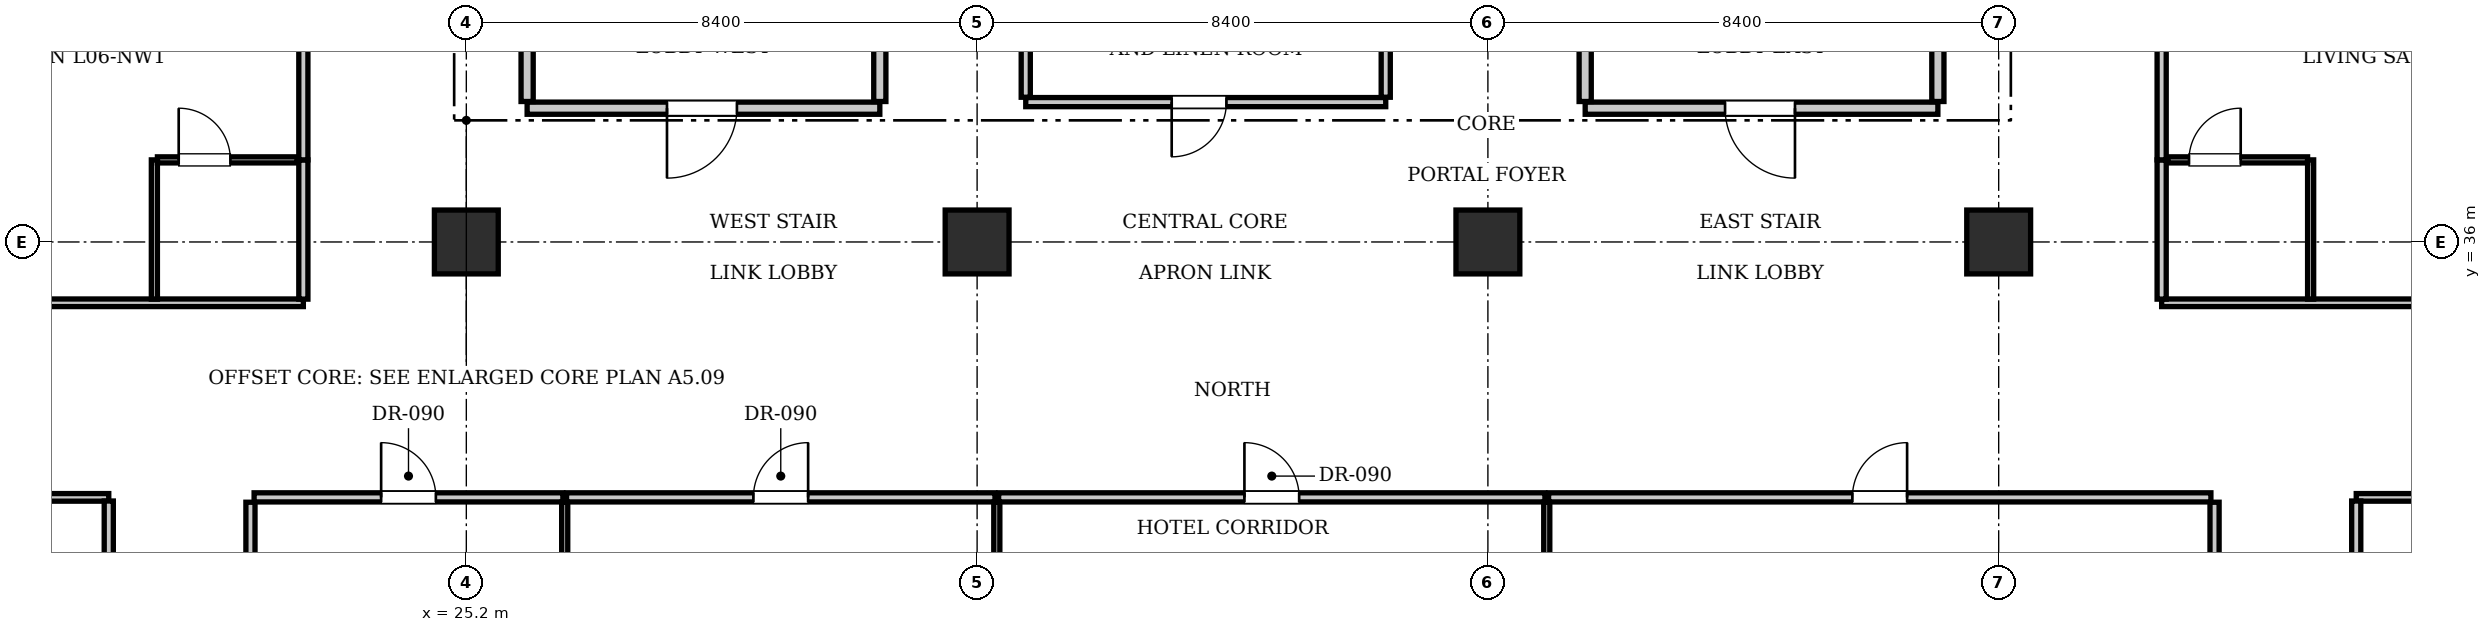
"""IFC4 building model, lengths in metres.
Left out: names, types, materials, properties, quantities, classifications, styles, units other than length and angle.
Written with IfcOpenShell. Run it as: python <this file> out.ifc"""

import sys

from ifc_helpers import new_model, si_unit, direction, frame, frame_2d, origin, origin_2d, place, context, subcontext, project, spatial, rectangle, extrude, element, fill, save


model = new_model("IFC4")
c1 = context("Model", 3, precision=1e-05, world=origin(), true_north=direction((0.0, 1.0)))
c2 = subcontext(c1, "Body", "Model", "MODEL_VIEW")
j1 = project(units=[si_unit("LENGTHUNIT", "METRE"), si_unit("PLANEANGLEUNIT", "RADIAN")], contexts=[c1])
p1 = place(None, origin())
s1 = spatial("IfcSite", under=j1, at=p1, CompositionType="ELEMENT")
p2 = place(p1, origin())
s2 = spatial("IfcBuilding", under=s1, at=p2, CompositionType="ELEMENT")
p3 = place(p2, frame((0.0, 0.0, 30.8)))
s3 = spatial("IfcBuildingStorey", under=s2, at=p3, CompositionType="ELEMENT", Elevation=30.8)
for number, where, z_axis, x_axis in (
    (1, (25.2, 36.0, 0.0), (0.0, 0.0, 1.0), (1.0, 0.0, 0.0)),
    (2, (33.6, 36.0, 0.0), (0.0, 0.0, 1.0), (1.0, 0.0, 0.0)),
    (3, (42.0, 36.0, 0.0), (0.0, 0.0, 1.0), (1.0, 0.0, 0.0)),
    (4, (50.4, 36.0, 0.0), (0.0, 0.0, 1.0), (1.0, 0.0, 0.0)),
):
    element("IfcColumn", number, at=place(p3, frame(where, z_axis=z_axis, x_axis=x_axis)), inside=s3, PredefinedType="COLUMN", context=c2, shape_type="SweptSolid", body=[
        extrude(rectangle(XDim=1.05, YDim=1.05, at=origin_2d()), origin(), (0.0, 0.0, 1.0), 3.85),
    ])
p4 = place(p3, frame((26.2, 38.2, 0.0), z_axis=(0.0, 0.0, 1.0), x_axis=(1.0, 0.0, 0.0)))
e5 = element("IfcWall", 5, at=p4, inside=s3, PredefinedType="PARTITIONING", context=c2, shape_type="SweptSolid", body=[
    extrude(rectangle(XDim=5.8, YDim=0.2, at=frame_2d((2.9, 0.0))), origin(), (0.0, 0.0, 1.0), 3.61),
])
p5 = place(p4, frame((2.3, 0.0, 0.0)))
e6 = element("IfcOpeningElement", 6, at=p5, cuts=e5, PredefinedType="OPENING", context=c2, shape_type="SweptSolid", body=[
    extrude(rectangle(XDim=1.15, YDim=2.15, at=frame_2d((0.575, 1.075))), frame((0.0, 0.11, 0.0), z_axis=(0.0, -1.0, 0.0), x_axis=(1.0, 0.0, 0.0)), (0.0, 0.0, 1.0), 0.22),
])
for number, where, z_axis, x_axis in (
    (7, (26.2, 38.31, 0.0), (0.0, 0.0, 1.0), (0.0, 1.0, 0.0)),
    (8, (32.0, 38.31, 0.0), (0.0, 0.0, 1.0), (0.0, 1.0, 0.0)),
):
    element("IfcWall", number, at=place(p3, frame(where, z_axis=z_axis, x_axis=x_axis)), inside=s3, PredefinedType="PARTITIONING", context=c2, shape_type="SweptSolid", body=[
        extrude(rectangle(XDim=3.07, YDim=0.2, at=frame_2d((1.535, 0.0))), origin(), (0.0, 0.0, 1.0), 3.61),
    ])
p6 = place(p3, frame((43.6, 38.2, 0.0), z_axis=(0.0, 0.0, 1.0), x_axis=(1.0, 0.0, 0.0)))
e9 = element("IfcWall", 9, at=p6, inside=s3, PredefinedType="PARTITIONING", context=c2, shape_type="SweptSolid", body=[
    extrude(rectangle(XDim=5.8, YDim=0.2, at=frame_2d((2.9, 0.0))), origin(), (0.0, 0.0, 1.0), 3.61),
])
p7 = place(p6, frame((2.3, 0.0, 0.0)))
e10 = element("IfcOpeningElement", 10, at=p7, cuts=e9, PredefinedType="OPENING", context=c2, shape_type="SweptSolid", body=[
    extrude(rectangle(XDim=1.15, YDim=2.15, at=frame_2d((0.575, 1.075))), frame((0.0, 0.11, 0.0), z_axis=(0.0, -1.0, 0.0), x_axis=(1.0, 0.0, 0.0)), (0.0, 0.0, 1.0), 0.22),
])
for number, where, z_axis, x_axis in (
    (11, (43.6, 38.31, 0.0), (0.0, 0.0, 1.0), (0.0, 1.0, 0.0)),
    (12, (49.4, 38.31, 0.0), (0.0, 0.0, 1.0), (0.0, 1.0, 0.0)),
):
    element("IfcWall", number, at=place(p3, frame(where, z_axis=z_axis, x_axis=x_axis)), inside=s3, PredefinedType="PARTITIONING", context=c2, shape_type="SweptSolid", body=[
        extrude(rectangle(XDim=3.07, YDim=0.2, at=frame_2d((1.535, 0.0))), origin(), (0.0, 0.0, 1.0), 3.61),
    ])
p8 = place(p3, frame((34.4, 38.3, 0.0), z_axis=(0.0, 0.0, 1.0), x_axis=(1.0, 0.0, 0.0)))
e13 = element("IfcWall", 13, at=p8, inside=s3, PredefinedType="PARTITIONING", context=c2, shape_type="SweptSolid", body=[
    extrude(rectangle(XDim=5.92, YDim=0.15, at=frame_2d((2.96, 0.0))), origin(), (0.0, 0.0, 1.0), 3.61),
])
p9 = place(p8, frame((2.4, 0.0, 0.0)))
e14 = element("IfcOpeningElement", 14, at=p9, cuts=e13, PredefinedType="OPENING", context=c2, shape_type="SweptSolid", body=[
    extrude(rectangle(XDim=0.9, YDim=2.1, at=frame_2d((0.45, 1.05))), frame((0.0, 0.085, 0.0), z_axis=(0.0, -1.0, 0.0), x_axis=(1.0, 0.0, 0.0)), (0.0, 0.0, 1.0), 0.17),
])
for number, where, z_axis, x_axis in (
    (15, (34.4, 38.38, 0.0), (0.0, 0.0, 1.0), (0.0, 1.0, 0.0)),
    (16, (40.32, 38.38, 0.0), (0.0, 0.0, 1.0), (0.0, 1.0, 0.0)),
):
    element("IfcWall", number, at=place(p3, frame(where, z_axis=z_axis, x_axis=x_axis)), inside=s3, PredefinedType="PARTITIONING", context=c2, shape_type="SweptSolid", body=[
        extrude(rectangle(XDim=2.84, YDim=0.15, at=frame_2d((1.42, 0.0))), origin(), (0.0, 0.0, 1.0), 3.61),
    ])
for number, where, z_axis, x_axis in (
    (17, (21.65, 23.48, 0.0), (0.0, 0.0, 1.0), (0.0, 1.0, 0.0)),
    (18, (53.95, 23.48, 0.0), (0.0, 0.0, 1.0), (0.0, 1.0, 0.0)),
):
    element("IfcWall", number, at=place(p3, frame(where, z_axis=z_axis, x_axis=x_axis)), inside=s3, PredefinedType="PARTITIONING", context=c2, shape_type="SweptSolid", body=[
        extrude(rectangle(XDim=8.24, YDim=0.15, at=frame_2d((4.12, 0.0))), origin(), (0.0, 0.0, 1.0), 3.61),
    ])
p10 = place(p3, frame((21.71, 31.8, 0.0), z_axis=(0.0, 0.0, 1.0), x_axis=(1.0, 0.0, 0.0)))
e19 = element("IfcWall", 19, at=p10, inside=s3, PredefinedType="PARTITIONING", context=c2, shape_type="SweptSolid", body=[
    extrude(rectangle(XDim=5.078, YDim=0.15, at=frame_2d((2.539, 0.0))), origin(), (0.0, 0.0, 1.0), 3.61),
])
p11 = place(p10, frame((2.089, 0.0, 0.0)))
e20 = element("IfcOpeningElement", 20, at=p11, cuts=e19, PredefinedType="OPENING", context=c2, shape_type="SweptSolid", body=[
    extrude(rectangle(XDim=0.9, YDim=2.1, at=frame_2d((0.45, 1.05))), frame((0.0, 0.085, 0.0), z_axis=(0.0, -1.0, 0.0), x_axis=(1.0, 0.0, 0.0)), (0.0, 0.0, 1.0), 0.17),
])
p12 = place(p3, frame((26.818, 23.48, 0.0), z_axis=(0.0, 0.0, 1.0), x_axis=(0.0, 1.0, 0.0)))
e21 = element("IfcWall", 21, at=p12, inside=s3, PredefinedType="PARTITIONING", context=c2, shape_type="SweptSolid", body=[
    extrude(rectangle(XDim=8.24, YDim=0.1, at=frame_2d((4.12, 0.0))), origin(), (0.0, 0.0, 1.0), 3.61),
])
p13 = place(p3, frame((26.848, 31.8, 0.0), z_axis=(0.0, 0.0, 1.0), x_axis=(1.0, 0.0, 0.0)))
e22 = element("IfcWall", 22, at=p13, inside=s3, PredefinedType="PARTITIONING", context=c2, shape_type="SweptSolid", body=[
    extrude(rectangle(XDim=7.046, YDim=0.15, at=frame_2d((3.523, 0.0))), origin(), (0.0, 0.0, 1.0), 3.61),
])
p14 = place(p13, frame((3.073, 0.0, 0.0)))
e23 = element("IfcOpeningElement", 23, at=p14, cuts=e22, PredefinedType="OPENING", context=c2, shape_type="SweptSolid", body=[
    extrude(rectangle(XDim=0.9, YDim=2.1, at=frame_2d((0.45, 1.05))), frame((0.0, 0.085, 0.0), z_axis=(0.0, -1.0, 0.0), x_axis=(1.0, 0.0, 0.0)), (0.0, 0.0, 1.0), 0.17),
])
p15 = place(p3, frame((33.924, 23.48, 0.0), z_axis=(0.0, 0.0, 1.0), x_axis=(0.0, 1.0, 0.0)))
e24 = element("IfcWall", 24, at=p15, inside=s3, PredefinedType="PARTITIONING", context=c2, shape_type="SweptSolid", body=[
    extrude(rectangle(XDim=8.24, YDim=0.1, at=frame_2d((4.12, 0.0))), origin(), (0.0, 0.0, 1.0), 3.61),
])
p16 = place(p3, frame((33.954, 31.8, 0.0), z_axis=(0.0, 0.0, 1.0), x_axis=(1.0, 0.0, 0.0)))
e25 = element("IfcWall", 25, at=p16, inside=s3, PredefinedType="PARTITIONING", context=c2, shape_type="SweptSolid", body=[
    extrude(rectangle(XDim=8.984, YDim=0.15, at=frame_2d((4.492, 0.0))), origin(), (0.0, 0.0, 1.0), 3.61),
])
p17 = place(p16, frame((4.042, 0.0, 0.0)))
e26 = element("IfcOpeningElement", 26, at=p17, cuts=e25, PredefinedType="OPENING", context=c2, shape_type="SweptSolid", body=[
    extrude(rectangle(XDim=0.9, YDim=2.1, at=frame_2d((0.45, 1.05))), frame((0.0, 0.085, 0.0), z_axis=(0.0, -1.0, 0.0), x_axis=(1.0, 0.0, 0.0)), (0.0, 0.0, 1.0), 0.17),
])
p18 = place(p3, frame((42.968, 23.48, 0.0), z_axis=(0.0, 0.0, 1.0), x_axis=(0.0, 1.0, 0.0)))
e27 = element("IfcWall", 27, at=p18, inside=s3, PredefinedType="PARTITIONING", context=c2, shape_type="SweptSolid", body=[
    extrude(rectangle(XDim=8.24, YDim=0.1, at=frame_2d((4.12, 0.0))), origin(), (0.0, 0.0, 1.0), 3.61),
])
p19 = place(p3, frame((42.998, 31.8, 0.0), z_axis=(0.0, 0.0, 1.0), x_axis=(1.0, 0.0, 0.0)))
e28 = element("IfcWall", 28, at=p19, inside=s3, PredefinedType="PARTITIONING", context=c2, shape_type="SweptSolid", body=[
    extrude(rectangle(XDim=10.892, YDim=0.15, at=frame_2d((5.446, 0.0))), origin(), (0.0, 0.0, 1.0), 3.61),
])
p20 = place(p19, frame((4.996, 0.0, 0.0)))
e29 = element("IfcOpeningElement", 29, at=p20, cuts=e28, PredefinedType="OPENING", context=c2, shape_type="SweptSolid", body=[
    extrude(rectangle(XDim=0.9, YDim=2.1, at=frame_2d((0.45, 1.05))), frame((0.0, 0.085, 0.0), z_axis=(0.0, -1.0, 0.0), x_axis=(1.0, 0.0, 0.0)), (0.0, 0.0, 1.0), 0.17),
])
p21 = place(p3, frame((10.9, 31.8, 0.0), z_axis=(0.0, 0.0, 1.0), x_axis=(1.0, 0.0, 0.0)))
e30 = element("IfcWall", 30, at=p21, inside=s3, PredefinedType="PARTITIONING", context=c2, shape_type="SweptSolid", body=[
    extrude(rectangle(XDim=8.42, YDim=0.125, at=frame_2d((4.21, 0.0))), origin(), (0.0, 0.0, 1.0), 3.61),
])
p22 = place(p3, frame((56.28, 31.8, 0.0), z_axis=(0.0, 0.0, 1.0), x_axis=(1.0, 0.0, 0.0)))
e31 = element("IfcWall", 31, at=p22, inside=s3, PredefinedType="PARTITIONING", context=c2, shape_type="SweptSolid", body=[
    extrude(rectangle(XDim=8.42, YDim=0.125, at=frame_2d((4.21, 0.0))), origin(), (0.0, 0.0, 1.0), 3.61),
])
for number, where, z_axis, x_axis in (
    (32, (19.32, 29.85, 0.0), (0.0, 0.0, 1.0), (0.0, 1.0, 0.0)),
    (33, (56.28, 29.85, 0.0), (0.0, 0.0, 1.0), (0.0, 1.0, 0.0)),
):
    element("IfcWall", number, at=place(p3, frame(where, z_axis=z_axis, x_axis=x_axis)), inside=s3, PredefinedType="PARTITIONING", context=c2, shape_type="SweptSolid", body=[
        extrude(rectangle(XDim=1.89, YDim=0.15, at=frame_2d((0.945, 0.0))), origin(), (0.0, 0.0, 1.0), 3.61),
    ])
p23 = place(p3, frame((10.9, 35.0, 0.0), z_axis=(0.0, 0.0, 1.0), x_axis=(1.0, 0.0, 0.0)))
e34 = element("IfcWall", 34, at=p23, inside=s3, PredefinedType="PARTITIONING", context=c2, shape_type="SweptSolid", body=[
    extrude(rectangle(XDim=11.62, YDim=0.125, at=frame_2d((5.81, 0.0))), origin(), (0.0, 0.0, 1.0), 3.61),
])
p24 = place(p3, frame((53.08, 35.0, 0.0), z_axis=(0.0, 0.0, 1.0), x_axis=(1.0, 0.0, 0.0)))
e35 = element("IfcWall", 35, at=p24, inside=s3, PredefinedType="PARTITIONING", context=c2, shape_type="SweptSolid", body=[
    extrude(rectangle(XDim=11.62, YDim=0.125, at=frame_2d((5.81, 0.0))), origin(), (0.0, 0.0, 1.0), 3.61),
])
p25 = place(p3, frame((22.52, 35.06, 0.0), z_axis=(0.0, 0.0, 1.0), x_axis=(0.0, 1.0, 0.0)))
e36 = element("IfcWall", 36, at=p25, inside=s3, PredefinedType="PARTITIONING", context=c2, shape_type="SweptSolid", body=[
    extrude(rectangle(XDim=2.29, YDim=0.15, at=frame_2d((1.145, 0.0))), origin(), (0.0, 0.0, 1.0), 3.61),
])
p26 = place(p3, frame((22.52, 37.35, 0.0), z_axis=(0.0, 0.0, 1.0), x_axis=(0.0, 1.0, 0.0)))
e37 = element("IfcWall", 37, at=p26, inside=s3, PredefinedType="PARTITIONING", context=c2, shape_type="SweptSolid", body=[
    extrude(rectangle(XDim=5.259, YDim=0.15, at=frame_2d((2.629, 0.0))), origin(), (0.0, 0.0, 1.0), 3.61),
])
p27 = place(p26, frame((2.154, 0.0, 0.0)))
e38 = element("IfcOpeningElement", 38, at=p27, cuts=e37, PredefinedType="OPENING", context=c2, shape_type="SweptSolid", body=[
    extrude(rectangle(XDim=0.95, YDim=2.15, at=frame_2d((0.475, 1.075))), frame((0.0, 0.085, 0.0), z_axis=(0.0, -1.0, 0.0), x_axis=(1.0, 0.0, 0.0)), (0.0, 0.0, 1.0), 0.17),
])
p28 = place(p3, frame((20.07, 35.06, 0.0), z_axis=(0.0, 0.0, 1.0), x_axis=(0.0, 1.0, 0.0)))
e39 = element("IfcWall", 39, at=p28, inside=s3, PredefinedType="PARTITIONING", context=c2, shape_type="SweptSolid", body=[
    extrude(rectangle(XDim=2.29, YDim=0.1, at=frame_2d((1.145, 0.0))), origin(), (0.0, 0.0, 1.0), 3.61),
])
p29 = place(p3, frame((20.12, 37.35, 0.0), z_axis=(0.0, 0.0, 1.0), x_axis=(1.0, 0.0, 0.0)))
e40 = element("IfcWall", 40, at=p29, inside=s3, PredefinedType="PARTITIONING", context=c2, shape_type="SweptSolid", body=[
    extrude(rectangle(XDim=2.3, YDim=0.1, at=frame_2d((1.15, 0.0))), origin(), (0.0, 0.0, 1.0), 3.61),
])
p30 = place(p29, frame((0.35, 0.0, 0.0)))
e41 = element("IfcOpeningElement", 41, at=p30, cuts=e40, PredefinedType="OPENING", context=c2, shape_type="SweptSolid", body=[
    extrude(rectangle(XDim=0.85, YDim=2.1, at=frame_2d((0.425, 1.05))), frame((0.0, 0.06, 0.0), z_axis=(0.0, -1.0, 0.0), x_axis=(1.0, 0.0, 0.0)), (0.0, 0.0, 1.0), 0.12),
])
p31 = place(p3, frame((53.08, 35.06, 0.0), z_axis=(0.0, 0.0, 1.0), x_axis=(0.0, 1.0, 0.0)))
e42 = element("IfcWall", 42, at=p31, inside=s3, PredefinedType="PARTITIONING", context=c2, shape_type="SweptSolid", body=[
    extrude(rectangle(XDim=2.29, YDim=0.15, at=frame_2d((1.145, 0.0))), origin(), (0.0, 0.0, 1.0), 3.61),
])
p32 = place(p3, frame((53.08, 37.35, 0.0), z_axis=(0.0, 0.0, 1.0), x_axis=(0.0, 1.0, 0.0)))
e43 = element("IfcWall", 43, at=p32, inside=s3, PredefinedType="PARTITIONING", context=c2, shape_type="SweptSolid", body=[
    extrude(rectangle(XDim=5.259, YDim=0.15, at=frame_2d((2.629, 0.0))), origin(), (0.0, 0.0, 1.0), 3.61),
])
p33 = place(p32, frame((2.154, 0.0, 0.0)))
e44 = element("IfcOpeningElement", 44, at=p33, cuts=e43, PredefinedType="OPENING", context=c2, shape_type="SweptSolid", body=[
    extrude(rectangle(XDim=0.95, YDim=2.15, at=frame_2d((0.475, 1.075))), frame((0.0, 0.085, 0.0), z_axis=(0.0, -1.0, 0.0), x_axis=(1.0, 0.0, 0.0)), (0.0, 0.0, 1.0), 0.17),
])
p34 = place(p3, frame((55.53, 35.06, 0.0), z_axis=(0.0, 0.0, 1.0), x_axis=(0.0, 1.0, 0.0)))
e45 = element("IfcWall", 45, at=p34, inside=s3, PredefinedType="PARTITIONING", context=c2, shape_type="SweptSolid", body=[
    extrude(rectangle(XDim=2.29, YDim=0.1, at=frame_2d((1.145, 0.0))), origin(), (0.0, 0.0, 1.0), 3.61),
])
p35 = place(p3, frame((53.18, 37.35, 0.0), z_axis=(0.0, 0.0, 1.0), x_axis=(1.0, 0.0, 0.0)))
e46 = element("IfcWall", 46, at=p35, inside=s3, PredefinedType="PARTITIONING", context=c2, shape_type="SweptSolid", body=[
    extrude(rectangle(XDim=2.3, YDim=0.1, at=frame_2d((1.15, 0.0))), origin(), (0.0, 0.0, 1.0), 3.61),
])
p36 = place(p35, frame((0.35, 0.0, 0.0)))
e47 = element("IfcOpeningElement", 47, at=p36, cuts=e46, PredefinedType="OPENING", context=c2, shape_type="SweptSolid", body=[
    extrude(rectangle(XDim=0.85, YDim=2.1, at=frame_2d((0.425, 1.05))), frame((0.0, 0.06, 0.0), z_axis=(0.0, -1.0, 0.0), x_axis=(1.0, 0.0, 0.0)), (0.0, 0.0, 1.0), 0.12),
])
p37 = place(p5, frame((1.15, 0.0, 0.0), z_axis=(0.0, 0.0, 1.0), x_axis=(-1.0, 0.0, 0.0)))
e48 = element("IfcDoor", 48, at=p37, inside=s3, OperationType="SINGLE_SWING_RIGHT", PredefinedType="DOOR", context=c2, shape_type="SweptSolid", body=[
    extrude(rectangle(XDim=1.15, YDim=2.15, at=frame_2d((0.575, 1.075))), frame((0.0, 0.025, 0.0), z_axis=(0.0, -1.0, 0.0), x_axis=(1.0, 0.0, 0.0)), (0.0, 0.0, 1.0), 0.05),
])
fill(e6, e48)
p38 = place(p7, frame((1.15, 0.0, 0.0), z_axis=(0.0, 0.0, 1.0), x_axis=(-1.0, 0.0, 0.0)))
e49 = element("IfcDoor", 49, at=p38, inside=s3, OperationType="SINGLE_SWING_LEFT", PredefinedType="DOOR", context=c2, shape_type="SweptSolid", body=[
    extrude(rectangle(XDim=1.15, YDim=2.15, at=frame_2d((0.575, 1.075))), frame((0.0, 0.025, 0.0), z_axis=(0.0, -1.0, 0.0), x_axis=(1.0, 0.0, 0.0)), (0.0, 0.0, 1.0), 0.05),
])
fill(e10, e49)
p39 = place(p9, frame((0.9, 0.0, 0.0), z_axis=(0.0, 0.0, 1.0), x_axis=(-1.0, 0.0, 0.0)))
e50 = element("IfcDoor", 50, at=p39, inside=s3, OperationType="SINGLE_SWING_RIGHT", PredefinedType="DOOR", context=c2, shape_type="SweptSolid", body=[
    extrude(rectangle(XDim=0.9, YDim=2.1, at=frame_2d((0.45, 1.05))), frame((0.0, 0.025, 0.0), z_axis=(0.0, -1.0, 0.0), x_axis=(1.0, 0.0, 0.0)), (0.0, 0.0, 1.0), 0.05),
])
fill(e14, e50)
p40 = place(p11, origin())
e51 = element("IfcDoor", 51, at=p40, inside=s3, OperationType="SINGLE_SWING_LEFT", PredefinedType="DOOR", context=c2, shape_type="SweptSolid", body=[
    extrude(rectangle(XDim=0.9, YDim=2.1, at=frame_2d((0.45, 1.05))), frame((0.0, 0.025, 0.0), z_axis=(0.0, -1.0, 0.0), x_axis=(1.0, 0.0, 0.0)), (0.0, 0.0, 1.0), 0.05),
])
fill(e20, e51)
p41 = place(p14, origin())
e52 = element("IfcDoor", 52, at=p41, inside=s3, OperationType="SINGLE_SWING_RIGHT", PredefinedType="DOOR", context=c2, shape_type="SweptSolid", body=[
    extrude(rectangle(XDim=0.9, YDim=2.1, at=frame_2d((0.45, 1.05))), frame((0.0, 0.025, 0.0), z_axis=(0.0, -1.0, 0.0), x_axis=(1.0, 0.0, 0.0)), (0.0, 0.0, 1.0), 0.05),
])
fill(e23, e52)
p42 = place(p17, origin())
e53 = element("IfcDoor", 53, at=p42, inside=s3, OperationType="SINGLE_SWING_LEFT", PredefinedType="DOOR", context=c2, shape_type="SweptSolid", body=[
    extrude(rectangle(XDim=0.9, YDim=2.1, at=frame_2d((0.45, 1.05))), frame((0.0, 0.025, 0.0), z_axis=(0.0, -1.0, 0.0), x_axis=(1.0, 0.0, 0.0)), (0.0, 0.0, 1.0), 0.05),
])
fill(e26, e53)
p43 = place(p20, origin())
e54 = element("IfcDoor", 54, at=p43, inside=s3, OperationType="SINGLE_SWING_RIGHT", PredefinedType="DOOR", context=c2, shape_type="SweptSolid", body=[
    extrude(rectangle(XDim=0.9, YDim=2.1, at=frame_2d((0.45, 1.05))), frame((0.0, 0.025, 0.0), z_axis=(0.0, -1.0, 0.0), x_axis=(1.0, 0.0, 0.0)), (0.0, 0.0, 1.0), 0.05),
])
fill(e29, e54)
p44 = place(p30, origin())
e55 = element("IfcDoor", 55, at=p44, inside=s3, OperationType="SINGLE_SWING_LEFT", PredefinedType="DOOR", context=c2, shape_type="SweptSolid", body=[
    extrude(rectangle(XDim=0.85, YDim=2.1, at=frame_2d((0.425, 1.05))), frame((0.0, 0.025, 0.0), z_axis=(0.0, -1.0, 0.0), x_axis=(1.0, 0.0, 0.0)), (0.0, 0.0, 1.0), 0.05),
])
fill(e41, e55)
p45 = place(p36, origin())
e56 = element("IfcDoor", 56, at=p45, inside=s3, OperationType="SINGLE_SWING_RIGHT", PredefinedType="DOOR", context=c2, shape_type="SweptSolid", body=[
    extrude(rectangle(XDim=0.85, YDim=2.1, at=frame_2d((0.425, 1.05))), frame((0.0, 0.025, 0.0), z_axis=(0.0, -1.0, 0.0), x_axis=(1.0, 0.0, 0.0)), (0.0, 0.0, 1.0), 0.05),
])
fill(e47, e56)
save(model, sys.argv[1])
